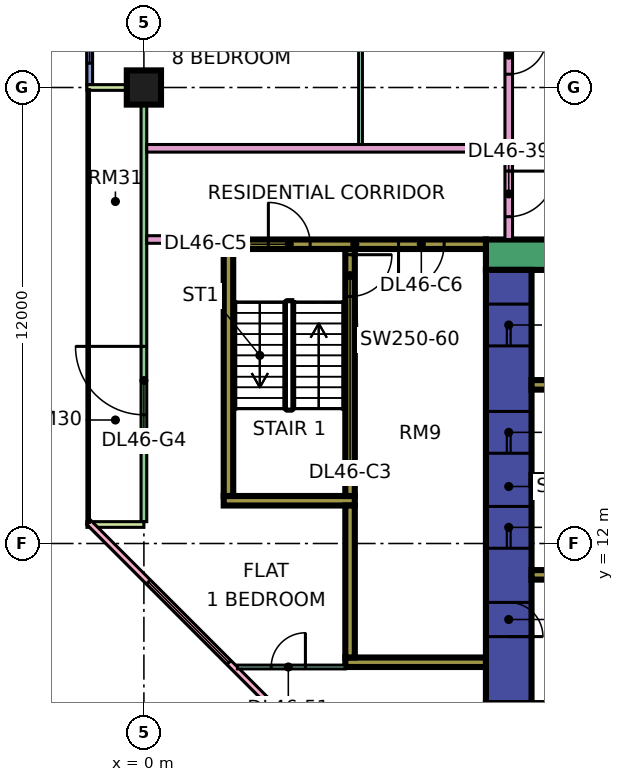
"""IFC4 building model, lengths in metres.
Left out: names, types, materials, properties, quantities, classifications, styles, units other than length and angle.
Written with IfcOpenShell. Run it as: python <this file> out.ifc"""

import sys

from ifc_helpers import new_model, si_unit, direction, frame, frame_2d, origin, origin_2d, place, context, subcontext, project, spatial, rectangle, extrude, element, fill, save


model = new_model("IFC4")
c1 = context("Model", 3, precision=1e-05, world=origin(), true_north=direction((0.0, 1.0)))
c2 = subcontext(c1, "Body", "Model", "MODEL_VIEW")
j1 = project(units=[si_unit("LENGTHUNIT", "METRE"), si_unit("PLANEANGLEUNIT", "RADIAN")], contexts=[c1])
p1 = place(None, origin())
s1 = spatial("IfcSite", under=j1, at=p1, CompositionType="ELEMENT")
p2 = place(p1, origin())
s2 = spatial("IfcBuilding", under=s1, at=p2, CompositionType="ELEMENT")
p3 = place(p2, frame((0.0, 0.0, 198.65)))
s3 = spatial("IfcBuildingStorey", under=s2, at=p3, CompositionType="ELEMENT", Elevation=198.65)
p4 = place(p3, frame((0.0, 24.0, 0.0), z_axis=(0.0, 0.0, 1.0), x_axis=(1.0, 0.0, 0.0)))
e1 = element("IfcColumn", 1, at=p4, inside=s3, PredefinedType="COLUMN", context=c2, shape_type="SweptSolid", body=[
    extrude(rectangle(XDim=0.9, YDim=0.9, at=origin_2d()), origin(), (0.0, 0.0, 1.0), 3.75),
])
p5 = place(p3, frame((9.0, 19.6, 0.0), z_axis=(0.0, 0.0, 1.0), x_axis=(1.0, 0.0, 0.0)))
e2 = element("IfcWall", 2, at=p5, inside=s3, PredefinedType="SHEAR", context=c2, shape_type="SweptSolid", body=[
    extrude(rectangle(XDim=25.0, YDim=0.8, at=frame_2d((12.5, 0.0))), origin(), (0.0, 0.0, 1.0), 3.75),
])
p6 = place(p5, frame((19.1, 0.0, 0.0)))
e3 = element("IfcOpeningElement", 3, at=p6, cuts=e2, PredefinedType="OPENING", context=c2, shape_type="SweptSolid", body=[
    extrude(rectangle(XDim=1.8, YDim=2.4, at=frame_2d((0.9, 1.2))), frame((0.0, 0.41, 0.0), z_axis=(0.0, -1.0, 0.0), x_axis=(1.0, 0.0, 0.0)), (0.0, 0.0, 1.0), 0.82),
])
p7 = place(p3, frame((9.6, 7.8, 0.0), z_axis=(0.0, 0.0, 1.0), x_axis=(0.0, 1.0, 0.0)))
e4 = element("IfcWall", 4, at=p7, inside=s3, PredefinedType="SHEAR", context=c2, shape_type="SweptSolid", body=[
    extrude(rectangle(XDim=11.4, YDim=1.2, at=frame_2d((5.7, 0.0))), origin(), (0.0, 0.0, 1.0), 3.75),
])
p8 = place(p7, frame((4.075, 0.0, 0.0)))
e5 = element("IfcOpeningElement", 5, at=p8, cuts=e4, PredefinedType="OPENING", context=c2, shape_type="SweptSolid", body=[
    extrude(rectangle(XDim=1.1, YDim=2.2, at=frame_2d((0.55, 1.1))), frame((0.0, 0.61, 0.0), z_axis=(0.0, -1.0, 0.0), x_axis=(1.0, 0.0, 0.0)), (0.0, 0.0, 1.0), 1.22),
])
p9 = place(p7, frame((6.575, 0.0, 0.0)))
e6 = element("IfcOpeningElement", 6, at=p9, cuts=e4, PredefinedType="OPENING", context=c2, shape_type="SweptSolid", body=[
    extrude(rectangle(XDim=1.1, YDim=2.2, at=frame_2d((0.55, 1.1))), frame((0.0, 0.61, 0.0), z_axis=(0.0, -1.0, 0.0), x_axis=(1.0, 0.0, 0.0)), (0.0, 0.0, 1.0), 1.22),
])
p10 = place(p7, frame((9.4, 0.0, 0.0)))
e7 = element("IfcOpeningElement", 7, at=p10, cuts=e4, PredefinedType="OPENING", context=c2, shape_type="SweptSolid", body=[
    extrude(rectangle(XDim=1.1, YDim=2.2, at=frame_2d((0.55, 1.1))), frame((0.0, 0.61, 0.0), z_axis=(0.0, -1.0, 0.0), x_axis=(1.0, 0.0, 0.0)), (0.0, 0.0, 1.0), 1.22),
])
p11 = place(p7, frame((1.75, 0.0, 0.0)))
e8 = element("IfcOpeningElement", 8, at=p11, cuts=e4, PredefinedType="OPENING", context=c2, shape_type="SweptSolid", body=[
    extrude(rectangle(XDim=0.9, YDim=2.1, at=frame_2d((0.45, 1.05))), frame((0.0, 0.61, 0.0), z_axis=(0.0, -1.0, 0.0), x_axis=(1.0, 0.0, 0.0)), (0.0, 0.0, 1.0), 1.22),
])
for number, where, z_axis, x_axis in (
    (9, (10.2, 11.175, 0.0), (0.0, 0.0, 1.0), (1.0, 0.0, 0.0)),
    (10, (10.2, 13.675, 0.0), (0.0, 0.0, 1.0), (1.0, 0.0, 0.0)),
    (11, (10.2, 16.175, 0.0), (0.0, 0.0, 1.0), (1.0, 0.0, 0.0)),
):
    element("IfcWall", number, at=place(p3, frame(where, z_axis=z_axis, x_axis=x_axis)), inside=s3, PredefinedType="SHEAR", context=c2, shape_type="SweptSolid", body=[
        extrude(rectangle(XDim=3.0, YDim=0.25, at=frame_2d((1.5, 0.0))), origin(), (0.0, 0.0, 1.0), 3.75),
    ])
p12 = place(p3, frame((2.1, 19.875, 0.0), z_axis=(0.0, 0.0, 1.0), x_axis=(1.0, 0.0, 0.0)))
e12 = element("IfcWall", 12, at=p12, inside=s3, PredefinedType="SHEAR", context=c2, shape_type="SweptSolid", body=[
    extrude(rectangle(XDim=6.9, YDim=0.25, at=frame_2d((3.45, 0.0))), origin(), (0.0, 0.0, 1.0), 3.75),
])
p13 = place(p12, frame((1.175, 0.0, 0.0)))
e13 = element("IfcOpeningElement", 13, at=p13, cuts=e12, PredefinedType="OPENING", context=c2, shape_type="SweptSolid", body=[
    extrude(rectangle(XDim=1.1, YDim=2.2, at=frame_2d((0.55, 1.1))), frame((0.0, 0.135, 0.0), z_axis=(0.0, -1.0, 0.0), x_axis=(1.0, 0.0, 0.0)), (0.0, 0.0, 1.0), 0.27),
])
p14 = place(p12, frame((4.6, 0.0, 0.0)))
e14 = element("IfcOpeningElement", 14, at=p14, cuts=e12, PredefinedType="OPENING", context=c2, shape_type="SweptSolid", body=[
    extrude(rectangle(XDim=1.2, YDim=2.2, at=frame_2d((0.6, 1.1))), frame((0.0, 0.135, 0.0), z_axis=(0.0, -1.0, 0.0), x_axis=(1.0, 0.0, 0.0)), (0.0, 0.0, 1.0), 0.27),
])
p15 = place(p3, frame((2.1, 13.125, 0.0), z_axis=(0.0, 0.0, 1.0), x_axis=(1.0, 0.0, 0.0)))
e15 = element("IfcWall", 15, at=p15, inside=s3, PredefinedType="SHEAR", context=c2, shape_type="SweptSolid", body=[
    extrude(rectangle(XDim=3.45, YDim=0.25, at=frame_2d((1.725, 0.0))), origin(), (0.0, 0.0, 1.0), 3.75),
])
p16 = place(p3, frame((2.225, 13.25, 0.0), z_axis=(0.0, 0.0, 1.0), x_axis=(0.0, 1.0, 0.0)))
e16 = element("IfcWall", 16, at=p16, inside=s3, PredefinedType="SHEAR", context=c2, shape_type="SweptSolid", body=[
    extrude(rectangle(XDim=6.5, YDim=0.25, at=frame_2d((3.25, 0.0))), origin(), (0.0, 0.0, 1.0), 3.75),
])
p17 = place(p3, frame((5.425, 13.25, 0.0), z_axis=(0.0, 0.0, 1.0), x_axis=(0.0, 1.0, 0.0)))
e17 = element("IfcWall", 17, at=p17, inside=s3, PredefinedType="SHEAR", context=c2, shape_type="SweptSolid", body=[
    extrude(rectangle(XDim=6.5, YDim=0.25, at=frame_2d((3.25, 0.0))), origin(), (0.0, 0.0, 1.0), 3.75),
])
p18 = place(p17, frame((5.25, 0.0, 0.0)))
e18 = element("IfcOpeningElement", 18, at=p18, cuts=e17, PredefinedType="OPENING", context=c2, shape_type="SweptSolid", body=[
    extrude(rectangle(XDim=1.1, YDim=2.2, at=frame_2d((0.55, 1.1))), frame((0.0, 0.135, 0.0), z_axis=(0.0, -1.0, 0.0), x_axis=(1.0, 0.0, 0.0)), (0.0, 0.0, 1.0), 0.27),
])
p19 = place(p3, frame((5.3, 8.875, 0.0), z_axis=(0.0, 0.0, 1.0), x_axis=(1.0, 0.0, 0.0)))
e19 = element("IfcWall", 19, at=p19, inside=s3, PredefinedType="SHEAR", context=c2, shape_type="SweptSolid", body=[
    extrude(rectangle(XDim=3.7, YDim=0.25, at=frame_2d((1.85, 0.0))), origin(), (0.0, 0.0, 1.0), 3.75),
])
p20 = place(p3, frame((5.425, 9.0, 0.0), z_axis=(0.0, 0.0, 1.0), x_axis=(0.0, 1.0, 0.0)))
e20 = element("IfcWall", 20, at=p20, inside=s3, PredefinedType="SHEAR", context=c2, shape_type="SweptSolid", body=[
    extrude(rectangle(XDim=4.0, YDim=0.25, at=frame_2d((2.0, 0.0))), origin(), (0.0, 0.0, 1.0), 3.75),
])
p21 = place(p3, frame((-1.425, 35.925, 0.0), z_axis=(0.0, 0.0, 1.0), x_axis=(0.0, -1.0, 0.0)))
e21 = element("IfcWall", 21, at=p21, inside=s3, PredefinedType="SOLIDWALL", context=c2, shape_type="SweptSolid", body=[
    extrude(rectangle(XDim=11.85, YDim=0.15, at=frame_2d((5.925, 0.0))), origin(), (0.0, 0.0, 1.0), 3.35),
])
p22 = place(p21, frame((0.562, 0.0, 0.45)))
e22 = element("IfcOpeningElement", 22, at=p22, cuts=e21, PredefinedType="OPENING", context=c2, shape_type="SweptSolid", body=[
    extrude(rectangle(XDim=1.8, YDim=2.4, at=frame_2d((0.9, 1.2))), frame((0.0, 0.085, 0.0), z_axis=(0.0, -1.0, 0.0), x_axis=(1.0, 0.0, 0.0)), (0.0, 0.0, 1.0), 0.17),
])
p23 = place(p21, frame((3.525, 0.0, 0.45)))
e23 = element("IfcOpeningElement", 23, at=p23, cuts=e21, PredefinedType="OPENING", context=c2, shape_type="SweptSolid", body=[
    extrude(rectangle(XDim=4.8, YDim=2.4, at=frame_2d((2.4, 1.2))), frame((0.0, 0.085, 0.0), z_axis=(0.0, -1.0, 0.0), x_axis=(1.0, 0.0, 0.0)), (0.0, 0.0, 1.0), 0.17),
])
p24 = place(p21, frame((9.488, 0.0, 0.45)))
e24 = element("IfcOpeningElement", 24, at=p24, cuts=e21, PredefinedType="OPENING", context=c2, shape_type="SweptSolid", body=[
    extrude(rectangle(XDim=1.8, YDim=2.4, at=frame_2d((0.9, 1.2))), frame((0.0, 0.085, 0.0), z_axis=(0.0, -1.0, 0.0), x_axis=(1.0, 0.0, 0.0)), (0.0, 0.0, 1.0), 0.17),
])
p25 = place(p3, frame((0.0, 23.925, 0.0), z_axis=(0.0, 0.0, 1.0), x_axis=(0.0, -1.0, 0.0)))
e25 = element("IfcWall", 25, at=p25, inside=s3, PredefinedType="SOLIDWALL", context=c2, shape_type="SweptSolid", body=[
    extrude(rectangle(XDim=11.35, YDim=0.15, at=frame_2d((5.675, 0.0))), origin(), (0.0, 0.0, 1.0), 3.35),
])
p26 = place(p25, frame((6.738, 0.0, 0.0)))
e26 = element("IfcOpeningElement", 26, at=p26, cuts=e25, PredefinedType="OPENING", context=c2, shape_type="SweptSolid", body=[
    extrude(rectangle(XDim=1.8, YDim=2.4, at=frame_2d((0.9, 1.2))), frame((0.0, 0.085, 0.0), z_axis=(0.0, -1.0, 0.0), x_axis=(1.0, 0.0, 0.0)), (0.0, 0.0, 1.0), 0.17),
])
for number, where, z_axis, x_axis in (
    (27, (-1.5, 24.0, 0.0), (0.0, 0.0, 1.0), (1.0, 0.0, 0.0)),
    (28, (-1.5, 12.5, 0.0), (0.0, 0.0, 1.0), (1.0, 0.0, 0.0)),
):
    element("IfcWall", number, at=place(p3, frame(where, z_axis=z_axis, x_axis=x_axis)), inside=s3, PredefinedType="SOLIDWALL", context=c2, shape_type="SweptSolid", body=[
        extrude(rectangle(XDim=1.5, YDim=0.15, at=frame_2d((0.75, 0.0))), origin(), (0.0, 0.0, 1.0), 3.35),
    ])
p27 = place(p3, frame((-1.447, 12.553, 0.0), z_axis=(0.0, 0.0, 1.0), x_axis=(0.707106781187, -0.707106781187, 0.0)))
e29 = element("IfcWall", 29, at=p27, inside=s3, PredefinedType="SOLIDWALL", context=c2, shape_type="SweptSolid", body=[
    extrude(rectangle(XDim=19.799, YDim=0.15, at=frame_2d((9.899, 0.0))), origin(), (0.0, 0.0, 1.0), 3.35),
])
p28 = place(p27, frame((2.212, 0.0, 0.45)))
e30 = element("IfcOpeningElement", 30, at=p28, cuts=e29, PredefinedType="OPENING", context=c2, shape_type="SweptSolid", body=[
    extrude(rectangle(XDim=3.0, YDim=2.4, at=frame_2d((1.5, 1.2))), frame((0.0, 0.085, 0.0), z_axis=(0.0, -1.0, 0.0), x_axis=(1.0, 0.0, 0.0)), (0.0, 0.0, 1.0), 0.17),
])
p29 = place(p27, frame((10.216, 0.0, 0.45)))
e31 = element("IfcOpeningElement", 31, at=p29, cuts=e29, PredefinedType="OPENING", context=c2, shape_type="SweptSolid", body=[
    extrude(rectangle(XDim=3.0, YDim=2.4, at=frame_2d((1.5, 1.2))), frame((0.0, 0.085, 0.0), z_axis=(0.0, -1.0, 0.0), x_axis=(1.0, 0.0, 0.0)), (0.0, 0.0, 1.0), 0.17),
])
p30 = place(p3, frame((0.074, 20.0, 0.0), z_axis=(0.0, 0.0, 1.0), x_axis=(1.0, 0.0, 0.0)))
e32 = element("IfcWall", 32, at=p30, inside=s3, PredefinedType="PARTITIONING", context=c2, shape_type="SweptSolid", body=[
    extrude(rectangle(XDim=2.026, YDim=0.2, at=frame_2d((1.013, 0.0))), origin(), (0.0, 0.0, 1.0), 3.35),
])
p31 = place(p3, frame((0.074, 22.4, 0.0), z_axis=(0.0, 0.0, 1.0), x_axis=(1.0, 0.0, 0.0)))
e33 = element("IfcWall", 33, at=p31, inside=s3, PredefinedType="PARTITIONING", context=c2, shape_type="SweptSolid", body=[
    extrude(rectangle(XDim=9.426, YDim=0.2, at=frame_2d((4.713, 0.0))), origin(), (0.0, 0.0, 1.0), 3.35),
])
p32 = place(p3, frame((2.461, 8.75, 0.0), z_axis=(0.0, 0.0, 1.0), x_axis=(1.0, 0.0, 0.0)))
e34 = element("IfcWall", 34, at=p32, inside=s3, PredefinedType="PARTITIONING", context=c2, shape_type="SweptSolid", body=[
    extrude(rectangle(XDim=2.839, YDim=0.1, at=frame_2d((1.419, 0.0))), origin(), (0.0, 0.0, 1.0), 3.35),
])
p33 = place(p32, frame((0.889, 0.0, 0.0)))
e35 = element("IfcOpeningElement", 35, at=p33, cuts=e34, PredefinedType="OPENING", context=c2, shape_type="SweptSolid", body=[
    extrude(rectangle(XDim=0.9, YDim=2.1, at=frame_2d((0.45, 1.05))), frame((0.0, 0.06, 0.0), z_axis=(0.0, -1.0, 0.0), x_axis=(1.0, 0.0, 0.0)), (0.0, 0.0, 1.0), 0.12),
])
p34 = place(p3, frame((5.7, 22.5, 0.0), z_axis=(0.0, 0.0, 1.0), x_axis=(0.0, 1.0, 0.0)))
e36 = element("IfcWall", 36, at=p34, inside=s3, PredefinedType="PARTITIONING", context=c2, shape_type="SweptSolid", body=[
    extrude(rectangle(XDim=4.45, YDim=0.1, at=frame_2d((2.225, 0.0))), origin(), (0.0, 0.0, 1.0), 3.35),
])
p35 = place(p3, frame((9.6, 20.0, 0.0), z_axis=(0.0, 0.0, 1.0), x_axis=(0.0, 1.0, 0.0)))
e37 = element("IfcWall", 37, at=p35, inside=s3, PredefinedType="PARTITIONING", context=c2, shape_type="SweptSolid", body=[
    extrude(rectangle(XDim=44.35, YDim=0.2, at=frame_2d((22.175, 0.0))), origin(), (0.0, 0.0, 1.0), 3.35),
])
p36 = place(p35, frame((17.1, 0.0, 0.0)))
e38 = element("IfcOpeningElement", 38, at=p36, cuts=e37, PredefinedType="OPENING", context=c2, shape_type="SweptSolid", body=[
    extrude(rectangle(XDim=1.0, YDim=2.1, at=frame_2d((0.5, 1.05))), frame((0.0, 0.11, 0.0), z_axis=(0.0, -1.0, 0.0), x_axis=(1.0, 0.0, 0.0)), (0.0, 0.0, 1.0), 0.22),
])
p37 = place(p35, frame((29.1, 0.0, 0.0)))
e39 = element("IfcOpeningElement", 39, at=p37, cuts=e37, PredefinedType="OPENING", context=c2, shape_type="SweptSolid", body=[
    extrude(rectangle(XDim=1.0, YDim=2.1, at=frame_2d((0.5, 1.05))), frame((0.0, 0.11, 0.0), z_axis=(0.0, -1.0, 0.0), x_axis=(1.0, 0.0, 0.0)), (0.0, 0.0, 1.0), 0.22),
])
p38 = place(p35, frame((0.6, 0.0, 0.0)))
e40 = element("IfcOpeningElement", 40, at=p38, cuts=e37, PredefinedType="OPENING", context=c2, shape_type="SweptSolid", body=[
    extrude(rectangle(XDim=1.2, YDim=2.1, at=frame_2d((0.6, 1.05))), frame((0.0, 0.11, 0.0), z_axis=(0.0, -1.0, 0.0), x_axis=(1.0, 0.0, 0.0)), (0.0, 0.0, 1.0), 0.22),
])
p39 = place(p35, frame((4.35, 0.0, 0.0)))
e41 = element("IfcOpeningElement", 41, at=p39, cuts=e37, PredefinedType="OPENING", context=c2, shape_type="SweptSolid", body=[
    extrude(rectangle(XDim=1.0, YDim=2.1, at=frame_2d((0.5, 1.05))), frame((0.0, 0.11, 0.0), z_axis=(0.0, -1.0, 0.0), x_axis=(1.0, 0.0, 0.0)), (0.0, 0.0, 1.0), 0.22),
])
p40 = place(p24, origin())
e42 = element("IfcWindow", 42, at=p40, inside=s3, PartitioningType="SINGLE_PANEL", PredefinedType="WINDOW", context=c2, shape_type="SweptSolid", body=[
    extrude(rectangle(XDim=1.8, YDim=2.4, at=frame_2d((0.9, 1.2))), frame((0.0, 0.03, 0.0), z_axis=(0.0, -1.0, 0.0), x_axis=(1.0, 0.0, 0.0)), (0.0, 0.0, 1.0), 0.06),
])
fill(e24, e42)
p41 = place(p26, frame((1.8, 0.0, 0.0), z_axis=(0.0, 0.0, 1.0), x_axis=(-1.0, 0.0, 0.0)))
e43 = element("IfcDoor", 43, at=p41, inside=s3, OperationType="DOUBLE_DOOR_SINGLE_SWING", PredefinedType="DOOR", context=c2, shape_type="SweptSolid", body=[
    extrude(rectangle(XDim=1.8, YDim=2.4, at=frame_2d((0.9, 1.2))), frame((0.0, 0.025, 0.0), z_axis=(0.0, -1.0, 0.0), x_axis=(1.0, 0.0, 0.0)), (0.0, 0.0, 1.0), 0.05),
])
fill(e26, e43)
p42 = place(p28, origin())
e44 = element("IfcWindow", 44, at=p42, inside=s3, PartitioningType="SINGLE_PANEL", PredefinedType="WINDOW", context=c2, shape_type="SweptSolid", body=[
    extrude(rectangle(XDim=3.0, YDim=2.4, at=frame_2d((1.5, 1.2))), frame((0.0, 0.03, 0.0), z_axis=(0.0, -1.0, 0.0), x_axis=(1.0, 0.0, 0.0)), (0.0, 0.0, 1.0), 0.06),
])
fill(e30, e44)
p43 = place(p8, origin())
e45 = element("IfcDoor", 45, at=p43, inside=s3, OperationType="DOUBLE_DOOR_SLIDING", PredefinedType="DOOR", context=c2, shape_type="SweptSolid", body=[
    extrude(rectangle(XDim=1.1, YDim=2.2, at=frame_2d((0.55, 1.1))), frame((0.0, 0.025, 0.0), z_axis=(0.0, -1.0, 0.0), x_axis=(1.0, 0.0, 0.0)), (0.0, 0.0, 1.0), 0.05),
])
fill(e5, e45)
p44 = place(p9, origin())
e46 = element("IfcDoor", 46, at=p44, inside=s3, OperationType="DOUBLE_DOOR_SLIDING", PredefinedType="DOOR", context=c2, shape_type="SweptSolid", body=[
    extrude(rectangle(XDim=1.1, YDim=2.2, at=frame_2d((0.55, 1.1))), frame((0.0, 0.025, 0.0), z_axis=(0.0, -1.0, 0.0), x_axis=(1.0, 0.0, 0.0)), (0.0, 0.0, 1.0), 0.05),
])
fill(e6, e46)
p45 = place(p10, origin())
e47 = element("IfcDoor", 47, at=p45, inside=s3, OperationType="DOUBLE_DOOR_SLIDING", PredefinedType="DOOR", context=c2, shape_type="SweptSolid", body=[
    extrude(rectangle(XDim=1.1, YDim=2.2, at=frame_2d((0.55, 1.1))), frame((0.0, 0.025, 0.0), z_axis=(0.0, -1.0, 0.0), x_axis=(1.0, 0.0, 0.0)), (0.0, 0.0, 1.0), 0.05),
])
fill(e7, e47)
p46 = place(p18, origin())
e48 = element("IfcDoor", 48, at=p46, inside=s3, OperationType="SINGLE_SWING_RIGHT", PredefinedType="DOOR", context=c2, shape_type="SweptSolid", body=[
    extrude(rectangle(XDim=1.1, YDim=2.2, at=frame_2d((0.55, 1.1))), frame((0.0, 0.025, 0.0), z_axis=(0.0, -1.0, 0.0), x_axis=(1.0, 0.0, 0.0)), (0.0, 0.0, 1.0), 0.05),
])
fill(e18, e48)
p47 = place(p11, frame((0.9, 0.0, 0.0), z_axis=(0.0, 0.0, 1.0), x_axis=(-1.0, 0.0, 0.0)))
e49 = element("IfcDoor", 49, at=p47, inside=s3, OperationType="SINGLE_SWING_LEFT", PredefinedType="DOOR", context=c2, shape_type="SweptSolid", body=[
    extrude(rectangle(XDim=0.9, YDim=2.1, at=frame_2d((0.45, 1.05))), frame((0.0, 0.025, 0.0), z_axis=(0.0, -1.0, 0.0), x_axis=(1.0, 0.0, 0.0)), (0.0, 0.0, 1.0), 0.05),
])
fill(e8, e49)
p48 = place(p13, origin())
e50 = element("IfcDoor", 50, at=p48, inside=s3, OperationType="SINGLE_SWING_LEFT", PredefinedType="DOOR", context=c2, shape_type="SweptSolid", body=[
    extrude(rectangle(XDim=1.1, YDim=2.2, at=frame_2d((0.55, 1.1))), frame((0.0, 0.025, 0.0), z_axis=(0.0, -1.0, 0.0), x_axis=(1.0, 0.0, 0.0)), (0.0, 0.0, 1.0), 0.05),
])
fill(e13, e50)
p49 = place(p14, frame((1.2, 0.0, 0.0), z_axis=(0.0, 0.0, 1.0), x_axis=(-1.0, 0.0, 0.0)))
e51 = element("IfcDoor", 51, at=p49, inside=s3, OperationType="SINGLE_SWING_LEFT", PredefinedType="DOOR", context=c2, shape_type="SweptSolid", body=[
    extrude(rectangle(XDim=1.2, YDim=2.2, at=frame_2d((0.6, 1.1))), frame((0.0, 0.025, 0.0), z_axis=(0.0, -1.0, 0.0), x_axis=(1.0, 0.0, 0.0)), (0.0, 0.0, 1.0), 0.05),
])
fill(e14, e51)
p50 = place(p38, origin())
e52 = element("IfcDoor", 52, at=p50, inside=s3, OperationType="SINGLE_SWING_RIGHT", PredefinedType="DOOR", context=c2, shape_type="SweptSolid", body=[
    extrude(rectangle(XDim=1.2, YDim=2.1, at=frame_2d((0.6, 1.05))), frame((0.0, 0.025, 0.0), z_axis=(0.0, -1.0, 0.0), x_axis=(1.0, 0.0, 0.0)), (0.0, 0.0, 1.0), 0.05),
])
fill(e40, e52)
p51 = place(p33, frame((0.9, 0.0, 0.0), z_axis=(0.0, 0.0, 1.0), x_axis=(-1.0, 0.0, 0.0)))
e53 = element("IfcDoor", 53, at=p51, inside=s3, OperationType="SINGLE_SWING_RIGHT", PredefinedType="DOOR", context=c2, shape_type="SweptSolid", body=[
    extrude(rectangle(XDim=0.9, YDim=2.1, at=frame_2d((0.45, 1.05))), frame((0.0, 0.025, 0.0), z_axis=(0.0, -1.0, 0.0), x_axis=(1.0, 0.0, 0.0)), (0.0, 0.0, 1.0), 0.05),
])
fill(e35, e53)
p52 = place(p39, origin())
e54 = element("IfcDoor", 54, at=p52, inside=s3, OperationType="SINGLE_SWING_RIGHT", PredefinedType="DOOR", context=c2, shape_type="SweptSolid", body=[
    extrude(rectangle(XDim=1.0, YDim=2.1, at=frame_2d((0.5, 1.05))), frame((0.0, 0.025, 0.0), z_axis=(0.0, -1.0, 0.0), x_axis=(1.0, 0.0, 0.0)), (0.0, 0.0, 1.0), 0.05),
])
fill(e41, e54)
save(model, sys.argv[1])
